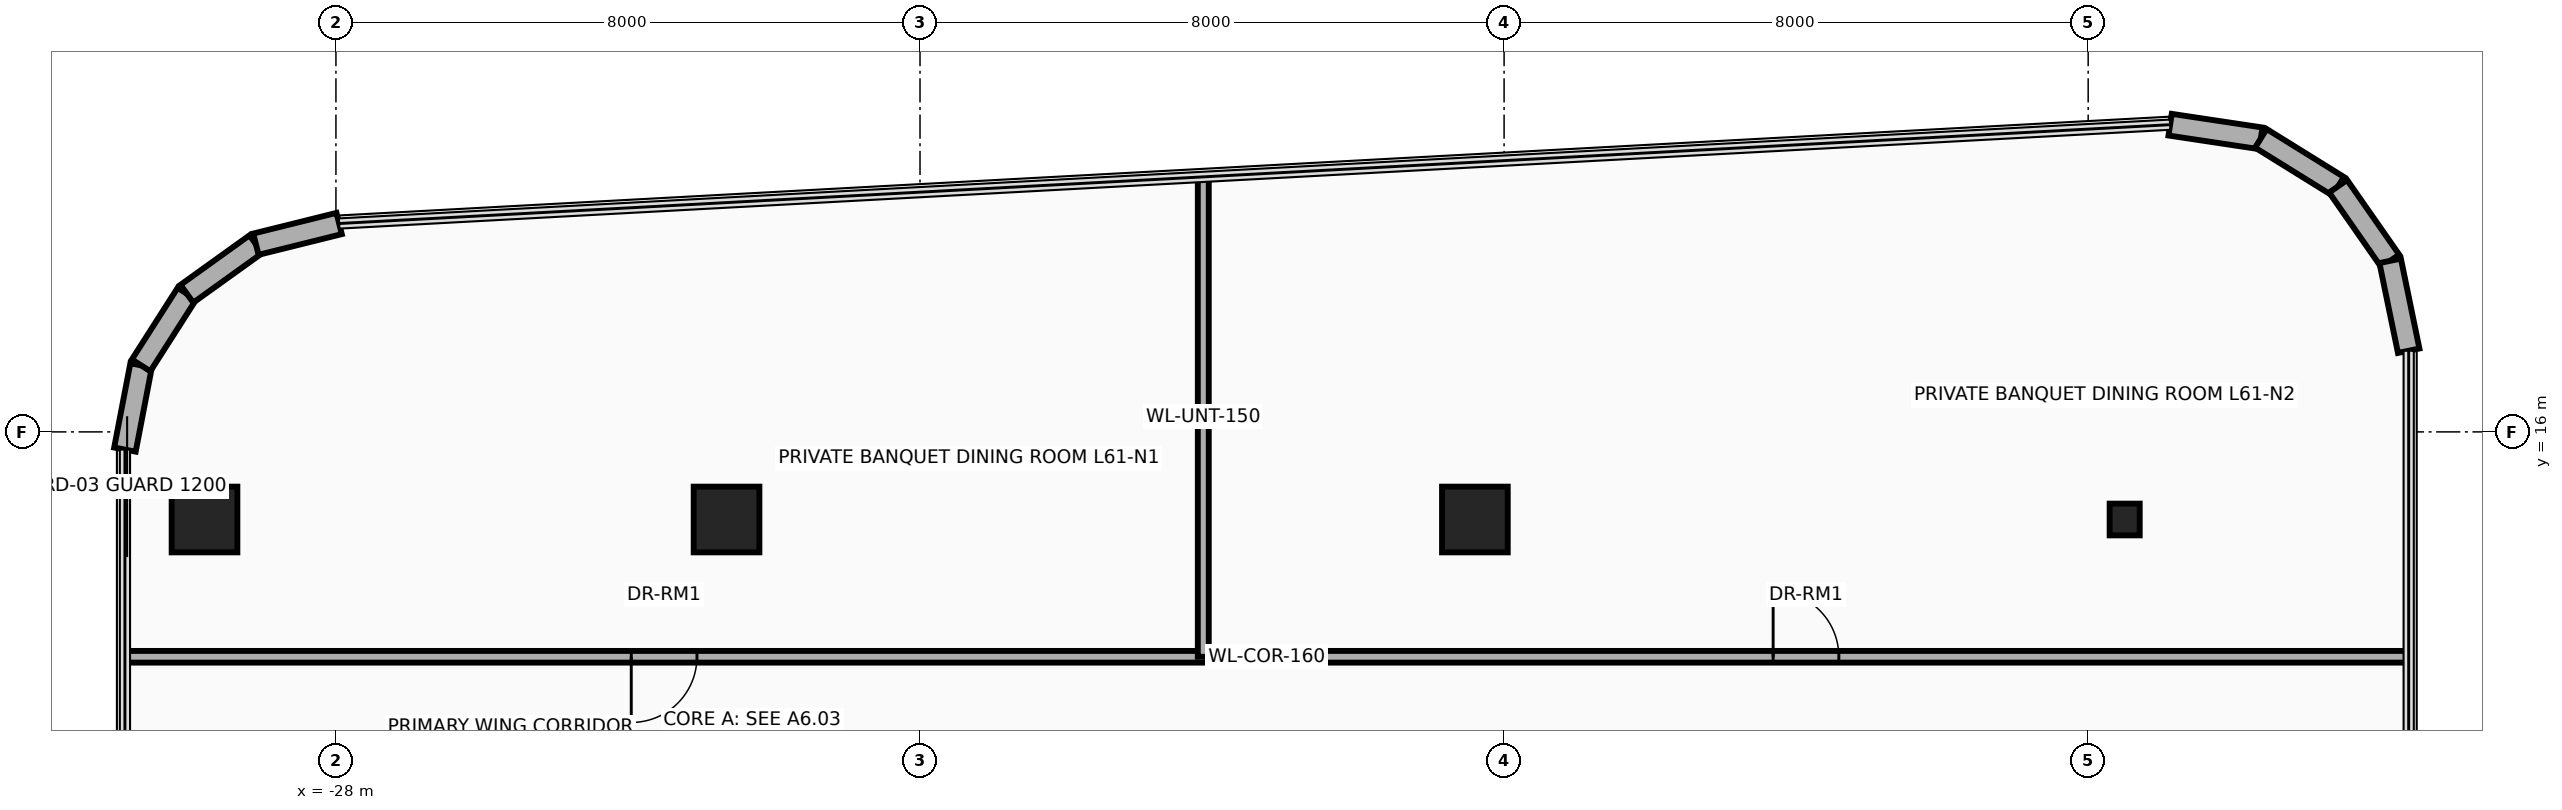
"""IFC4 building model, lengths in metres.
Left out: names, types, materials, properties, quantities, classifications, styles, units other than length and angle.
Written with IfcOpenShell. Run it as: python <this file> out.ifc"""

import sys

from ifc_helpers import new_model, si_unit, direction, frame, frame_2d, origin, origin_2d, place, context, subcontext, project, spatial, rectangle, i_section, extrude, source, transform, mapped, element, fill, save


model = new_model("IFC4")
c1 = context("Model", 3, precision=1e-05, world=origin(), true_north=direction((0.0, 1.0)))
c2 = subcontext(c1, "Body", "Model", "MODEL_VIEW")
j1 = project(units=[si_unit("LENGTHUNIT", "METRE"), si_unit("PLANEANGLEUNIT", "RADIAN")], contexts=[c1])
p1 = place(None, origin())
s1 = spatial("IfcSite", under=j1, at=p1, CompositionType="ELEMENT")
p2 = place(p1, origin())
s2 = spatial("IfcBuilding", under=s1, at=p2, CompositionType="ELEMENT")
p3 = place(p2, frame((0.0, 0.0, 237.0)))
s3 = spatial("IfcBuildingStorey", under=s2, at=p3, CompositionType="ELEMENT", Elevation=237.0)
m1 = source(origin(), c2, "Body", "SweptSolid", [
    extrude(rectangle(XDim=0.9, YDim=0.9, at=origin_2d()), origin(), (0.0, 0.0, 1.0), 3.5),
])
for number, where, z_axis, x_axis in (
    (1, (-29.8, 14.8, 0.0), (0.0, 0.0, 1.0), (1.0, 0.0, 0.0)),
    (2, (-22.65, 14.8, 0.0), (0.0, 0.0, 1.0), (1.0, 0.0, 0.0)),
    (3, (-12.4, 14.8, 0.0), (0.0, 0.0, 1.0), (1.0, 0.0, 0.0)),
):
    element("IfcColumn", number, at=place(p3, frame(where, z_axis=z_axis, x_axis=x_axis)), inside=s3, PredefinedType="COLUMN", context=c2, shape_type="MappedRepresentation", body=[
        mapped(m1, transform((0.0, 0.0, 0.0), x_axis=(1.0, 0.0, 0.0), y_axis=(0.0, 1.0, 0.0), z_axis=(0.0, 0.0, 1.0), scale=1.0)),
    ])
m2 = source(origin(), c2, "Body", "SweptSolid", [
    extrude(i_section(OverallWidth=0.412, OverallDepth=0.435, WebThickness=0.036, FlangeThickness=0.057, at=origin_2d()), origin(), (0.0, 0.0, 1.0), 3.5),
])
p4 = place(p3, frame((-3.5, 14.8, 0.0), z_axis=(0.0, 0.0, 1.0), x_axis=(1.0, 0.0, 0.0)))
e4 = element("IfcColumn", 4, at=p4, inside=s3, PredefinedType="COLUMN", context=c2, shape_type="MappedRepresentation", body=[
    mapped(m2, transform((0.0, 0.0, 0.0), x_axis=(1.0, 0.0, 0.0), y_axis=(0.0, 1.0, 0.0), z_axis=(0.0, 0.0, 1.0), scale=1.0)),
])
p5 = place(p3, frame((-30.89, 15.758, 0.0), z_axis=(0.0, 0.0, 1.0), x_axis=(0.18831542659, 0.982108598938, 0.0)))
e5 = element("IfcWall", 5, at=p5, inside=s3, PredefinedType="SOLIDWALL", context=c2, shape_type="SweptSolid", body=[
    extrude(rectangle(XDim=1.175, YDim=0.3, at=frame_2d((0.587, 0.0))), origin(), (0.0, 0.0, 1.0), 3.26),
])
p6 = place(p3, frame((-30.669, 16.911, 0.0), z_axis=(0.0, 0.0, 1.0), x_axis=(0.538678781902, 0.84251122837, 0.0)))
e6 = element("IfcWall", 6, at=p6, inside=s3, PredefinedType="SOLIDWALL", context=c2, shape_type="SweptSolid", body=[
    extrude(rectangle(XDim=1.164, YDim=0.3, at=frame_2d((0.582, 0.0))), origin(), (0.0, 0.0, 1.0), 3.26),
])
p7 = place(p3, frame((-30.042, 17.892, 0.0), z_axis=(0.0, 0.0, 1.0), x_axis=(0.812313539683, 0.583220981487, 0.0)))
e7 = element("IfcWall", 7, at=p7, inside=s3, PredefinedType="SOLIDWALL", context=c2, shape_type="SweptSolid", body=[
    extrude(rectangle(XDim=1.164, YDim=0.3, at=frame_2d((0.582, 0.0))), origin(), (0.0, 0.0, 1.0), 3.26),
])
p8 = place(p3, frame((-29.096, 18.571, 0.0), z_axis=(0.0, 0.0, 1.0), x_axis=(0.97050812798, 0.241068400098, 0.0)))
e8 = element("IfcWall", 8, at=p8, inside=s3, PredefinedType="SOLIDWALL", context=c2, shape_type="SweptSolid", body=[
    extrude(rectangle(XDim=1.175, YDim=0.3, at=frame_2d((0.587, 0.0))), origin(), (0.0, 0.0, 1.0), 3.26),
])
p9 = place(p3, frame((-2.878, 20.208, 0.0), z_axis=(0.0, 0.0, 1.0), x_axis=(0.988902138571, -0.148568369208, 0.0)))
e9 = element("IfcWall", 9, at=p9, inside=s3, PredefinedType="SOLIDWALL", context=c2, shape_type="SweptSolid", body=[
    extrude(rectangle(XDim=1.257, YDim=0.3, at=frame_2d((0.628, 0.0))), origin(), (0.0, 0.0, 1.0), 3.26),
])
p10 = place(p3, frame((-1.635, 20.021, 0.0), z_axis=(0.0, 0.0, 1.0), x_axis=(0.849646224094, -0.52735310171, 0.0)))
e10 = element("IfcWall", 10, at=p10, inside=s3, PredefinedType="SOLIDWALL", context=c2, shape_type="SweptSolid", body=[
    extrude(rectangle(XDim=1.245, YDim=0.3, at=frame_2d((0.623, 0.0))), origin(), (0.0, 0.0, 1.0), 3.26),
])
p11 = place(p3, frame((-0.576, 19.364, 0.0), z_axis=(0.0, 0.0, 1.0), x_axis=(0.572304219931, -0.820041389107, 0.0)))
e11 = element("IfcWall", 11, at=p11, inside=s3, PredefinedType="SOLIDWALL", context=c2, shape_type="SweptSolid", body=[
    extrude(rectangle(XDim=1.246, YDim=0.3, at=frame_2d((0.623, 0.0))), origin(), (0.0, 0.0, 1.0), 3.26),
])
p12 = place(p3, frame((0.136, 18.343, 0.0), z_axis=(0.0, 0.0, 1.0), x_axis=(0.201603599025, -0.979467196419, 0.0)))
e12 = element("IfcWall", 12, at=p12, inside=s3, PredefinedType="SOLIDWALL", context=c2, shape_type="SweptSolid", body=[
    extrude(rectangle(XDim=1.257, YDim=0.3, at=frame_2d((0.628, 0.0))), origin(), (0.0, 0.0, 1.0), 3.26),
])
p13 = place(p3, frame((-30.89, 12.92, 0.0), z_axis=(0.0, 0.0, 1.0), x_axis=(1.0, 0.0, 0.0)))
e13 = element("IfcWall", 13, at=p13, inside=s3, PredefinedType="PARTITIONING", context=c2, shape_type="SweptSolid", body=[
    extrude(rectangle(XDim=31.28, YDim=0.16, at=frame_2d((15.64, 0.0))), origin(), (0.0, 0.0, 1.0), 2.634),
])
p14 = place(p13, frame((6.935, 0.0, 0.0)))
e14 = element("IfcOpeningElement", 14, at=p14, cuts=e13, PredefinedType="OPENING", context=c2, shape_type="SweptSolid", body=[
    extrude(rectangle(XDim=0.9, YDim=2.1, at=frame_2d((0.45, 1.05))), frame((0.0, 0.095, 0.0), z_axis=(0.0, -1.0, 0.0), x_axis=(1.0, 0.0, 0.0)), (0.0, 0.0, 1.0), 0.19),
])
p15 = place(p13, frame((22.575, 0.0, 0.0)))
e15 = element("IfcOpeningElement", 15, at=p15, cuts=e13, PredefinedType="OPENING", context=c2, shape_type="SweptSolid", body=[
    extrude(rectangle(XDim=0.9, YDim=2.1, at=frame_2d((0.45, 1.05))), frame((0.0, 0.095, 0.0), z_axis=(0.0, -1.0, 0.0), x_axis=(1.0, 0.0, 0.0)), (0.0, 0.0, 1.0), 0.19),
])
p16 = place(p3, frame((-16.12, 12.92, 0.0), z_axis=(0.0, 0.0, 1.0), x_axis=(0.0, 1.0, 0.0)))
e16 = element("IfcWall", 16, at=p16, inside=s3, PredefinedType="PARTITIONING", context=c2, shape_type="SweptSolid", body=[
    extrude(rectangle(XDim=6.573, YDim=0.15, at=frame_2d((3.287, 0.0))), origin(), (0.0, 0.0, 1.0), 2.544),
])
p17 = place(p14, frame((0.9, 0.0, 0.0), z_axis=(0.0, 0.0, 1.0), x_axis=(-1.0, 0.0, 0.0)))
e17 = element("IfcDoor", 17, at=p17, inside=s3, OperationType="SINGLE_SWING_LEFT", PredefinedType="DOOR", context=c2, shape_type="SweptSolid", body=[
    extrude(rectangle(XDim=0.9, YDim=2.1, at=frame_2d((0.45, 1.05))), frame((0.0, 0.025, 0.0), z_axis=(0.0, -1.0, 0.0), x_axis=(1.0, 0.0, 0.0)), (0.0, 0.0, 1.0), 0.05),
])
fill(e14, e17)
p18 = place(p15, origin())
e18 = element("IfcDoor", 18, at=p18, inside=s3, OperationType="SINGLE_SWING_RIGHT", PredefinedType="DOOR", context=c2, shape_type="SweptSolid", body=[
    extrude(rectangle(XDim=0.9, YDim=2.1, at=frame_2d((0.45, 1.05))), frame((0.0, 0.025, 0.0), z_axis=(0.0, -1.0, 0.0), x_axis=(1.0, 0.0, 0.0)), (0.0, 0.0, 1.0), 0.05),
])
fill(e15, e18)
save(model, sys.argv[1])
